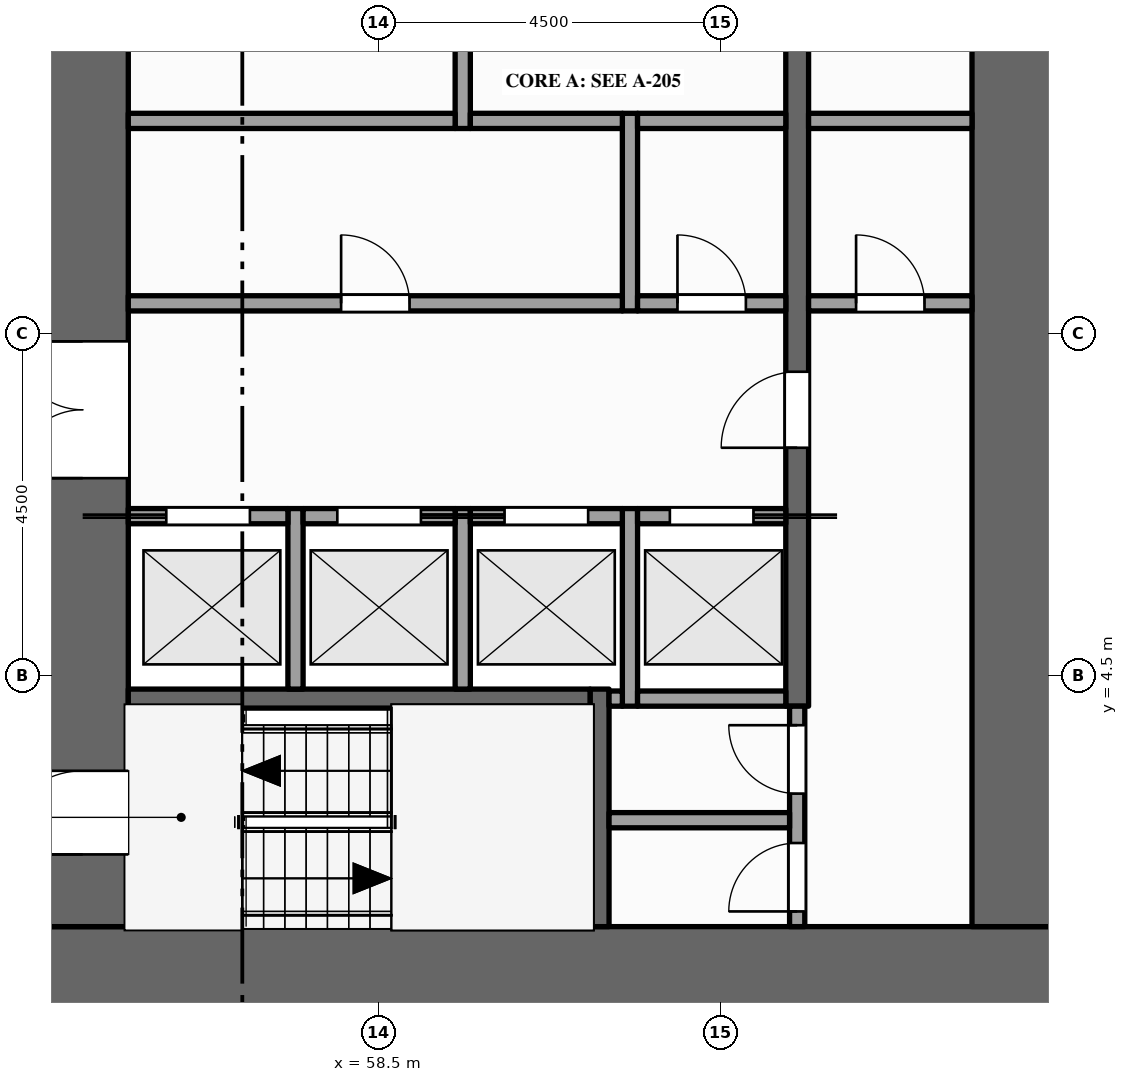
"""IFC4 building model, lengths in metres.
Left out: names, types, materials, properties, quantities, classifications, styles, units other than length and angle.
Written with IfcOpenShell. Run it as: python <this file> out.ifc"""

import sys

from ifc_helpers import new_model, si_unit, direction, frame, frame_2d, origin, place, context, subcontext, project, spatial, rectangle, extrude, element, fill, save


model = new_model("IFC4")
c1 = context("Model", 3, precision=1e-05, world=origin(), true_north=direction((0.0, 1.0)))
c2 = subcontext(c1, "Body", "Model", "MODEL_VIEW")
j1 = project(units=[si_unit("LENGTHUNIT", "METRE"), si_unit("PLANEANGLEUNIT", "RADIAN")], contexts=[c1])
p1 = place(None, origin())
s1 = spatial("IfcSite", under=j1, at=p1, CompositionType="ELEMENT")
p2 = place(p1, origin())
s2 = spatial("IfcBuilding", under=s1, at=p2, CompositionType="ELEMENT")
p3 = place(p2, frame((0.0, 0.0, 24.0)))
s3 = spatial("IfcBuildingStorey", under=s2, at=p3, CompositionType="ELEMENT", Elevation=24.0)
p4 = place(p3, frame((67.5, 0.6, -0.15), z_axis=(0.0, 0.0, 1.0), x_axis=(-1.0, 0.0, 0.0)))
e1 = element("IfcWall", 1, at=p4, inside=s3, PredefinedType="SHEAR", context=c2, shape_type="SweptSolid", body=[
    extrude(rectangle(XDim=13.5, YDim=1.2, at=frame_2d((6.75, 0.0))), origin(), (0.0, 0.0, 1.0), 5.0),
])
p5 = place(p3, frame((54.6, 1.2, -0.15), z_axis=(0.0, 0.0, 1.0), x_axis=(0.0, 1.0, 0.0)))
e2 = element("IfcWall", 2, at=p5, inside=s3, PredefinedType="SHEAR", context=c2, shape_type="SweptSolid", body=[
    extrude(rectangle(XDim=20.1, YDim=1.2, at=frame_2d((10.05, 0.0))), origin(), (0.0, 0.0, 1.0), 5.0),
])
p6 = place(p5, frame((5.9, 0.0, 0.15)))
e3 = element("IfcOpeningElement", 3, at=p6, cuts=e2, PredefinedType="OPENING", context=c2, shape_type="SweptSolid", body=[
    extrude(rectangle(XDim=1.8, YDim=2.1, at=frame_2d((0.9, 1.05))), frame((0.0, 0.61, 0.0), z_axis=(0.0, -1.0, 0.0), x_axis=(1.0, 0.0, 0.0)), (0.0, 0.0, 1.0), 1.22),
])
p7 = place(p5, frame((11.95, 0.0, 0.15)))
e4 = element("IfcOpeningElement", 4, at=p7, cuts=e2, PredefinedType="OPENING", context=c2, shape_type="SweptSolid", body=[
    extrude(rectangle(XDim=1.1, YDim=2.1, at=frame_2d((0.55, 1.05))), frame((0.0, 0.61, 0.0), z_axis=(0.0, -1.0, 0.0), x_axis=(1.0, 0.0, 0.0)), (0.0, 0.0, 1.0), 1.22),
])
p8 = place(p5, frame((0.95, 0.0, 0.15)))
e5 = element("IfcOpeningElement", 5, at=p8, cuts=e2, PredefinedType="OPENING", context=c2, shape_type="SweptSolid", body=[
    extrude(rectangle(XDim=1.1, YDim=2.1, at=frame_2d((0.55, 1.05))), frame((0.0, 0.61, 0.0), z_axis=(0.0, -1.0, 0.0), x_axis=(1.0, 0.0, 0.0)), (0.0, 0.0, 1.0), 1.22),
])
p9 = place(p5, frame((18.15, 0.0, 0.15)))
e6 = element("IfcOpeningElement", 6, at=p9, cuts=e2, PredefinedType="OPENING", context=c2, shape_type="SweptSolid", body=[
    extrude(rectangle(XDim=1.1, YDim=2.1, at=frame_2d((0.55, 1.05))), frame((0.0, 0.61, 0.0), z_axis=(0.0, -1.0, 0.0), x_axis=(1.0, 0.0, 0.0)), (0.0, 0.0, 1.0), 1.22),
])
p10 = place(p3, frame((66.9, 1.2, -0.15), z_axis=(0.0, 0.0, 1.0), x_axis=(0.0, 1.0, 0.0)))
e7 = element("IfcWall", 7, at=p10, inside=s3, PredefinedType="SHEAR", context=c2, shape_type="SweptSolid", body=[
    extrude(rectangle(XDim=20.1, YDim=1.2, at=frame_2d((10.05, 0.0))), origin(), (0.0, 0.0, 1.0), 5.0),
])
for number, where, z_axis, x_axis in (
    (8, (57.4, 4.325, 0.0), (0.0, 0.0, 1.0), (0.0, 1.0, 0.0)),
    (9, (59.6, 4.325, 0.0), (0.0, 0.0, 1.0), (0.0, 1.0, 0.0)),
):
    element("IfcWall", number, at=place(p3, frame(where, z_axis=z_axis, x_axis=x_axis)), inside=s3, PredefinedType="SOLIDWALL", context=c2, shape_type="SweptSolid", body=[
        extrude(rectangle(XDim=2.375, YDim=0.2, at=frame_2d((1.188, 0.0))), origin(), (0.0, 0.0, 1.0), 4.85),
    ])
p11 = place(p3, frame((59.6, 11.7, 0.0), z_axis=(0.0, 0.0, 1.0), x_axis=(0.0, 1.0, 0.0)))
e10 = element("IfcWall", 10, at=p11, inside=s3, PredefinedType="PARTITIONING", context=c2, shape_type="SweptSolid", body=[
    extrude(rectangle(XDim=3.8, YDim=0.2, at=frame_2d((1.9, 0.0))), origin(), (0.0, 0.0, 1.0), 4.85),
])
p12 = place(p11, frame((1.5, 0.0, 0.0)))
e11 = element("IfcOpeningElement", 11, at=p12, cuts=e10, PredefinedType="OPENING", context=c2, shape_type="SweptSolid", body=[
    extrude(rectangle(XDim=1.0, YDim=2.1, at=frame_2d((0.5, 1.05))), frame((0.0, 0.11, 0.0), z_axis=(0.0, -1.0, 0.0), x_axis=(1.0, 0.0, 0.0)), (0.0, 0.0, 1.0), 0.22),
])
p13 = place(p3, frame((61.4, 1.2, 0.0), z_axis=(0.0, 0.0, 1.0), x_axis=(0.0, 1.0, 0.0)))
e12 = element("IfcWall", 12, at=p13, inside=s3, PredefinedType="SHEAR", context=c2, shape_type="SweptSolid", body=[
    extrude(rectangle(XDim=3.125, YDim=0.25, at=frame_2d((1.562, 0.0))), origin(), (0.0, 0.0, 1.0), 4.85),
])
p14 = place(p3, frame((61.8, 4.1, 0.0), z_axis=(0.0, 0.0, 1.0), x_axis=(0.0, 1.0, 0.0)))
e13 = element("IfcWall", 13, at=p14, inside=s3, PredefinedType="SOLIDWALL", context=c2, shape_type="SweptSolid", body=[
    extrude(rectangle(XDim=2.6, YDim=0.2, at=frame_2d((1.3, 0.0))), origin(), (0.0, 0.0, 1.0), 4.85),
])
p15 = place(p3, frame((61.8, 9.3, 0.0), z_axis=(0.0, 0.0, 1.0), x_axis=(0.0, 1.0, 0.0)))
e14 = element("IfcWall", 14, at=p15, inside=s3, PredefinedType="PARTITIONING", context=c2, shape_type="SweptSolid", body=[
    extrude(rectangle(XDim=2.6, YDim=0.2, at=frame_2d((1.3, 0.0))), origin(), (0.0, 0.0, 1.0), 4.85),
])
p16 = place(p3, frame((64.0, 1.2, 0.0), z_axis=(0.0, 0.0, 1.0), x_axis=(0.0, 1.0, 0.0)))
e15 = element("IfcWall", 15, at=p16, inside=s3, PredefinedType="PARTITIONING", context=c2, shape_type="SweptSolid", body=[
    extrude(rectangle(XDim=2.9, YDim=0.2, at=frame_2d((1.45, 0.0))), origin(), (0.0, 0.0, 1.0), 4.85),
])
p17 = place(p16, frame((0.2, 0.0, 0.0)))
e16 = element("IfcOpeningElement", 16, at=p17, cuts=e15, PredefinedType="OPENING", context=c2, shape_type="SweptSolid", body=[
    extrude(rectangle(XDim=0.9, YDim=2.1, at=frame_2d((0.45, 1.05))), frame((0.0, 0.11, 0.0), z_axis=(0.0, -1.0, 0.0), x_axis=(1.0, 0.0, 0.0)), (0.0, 0.0, 1.0), 0.22),
])
p18 = place(p16, frame((1.75, 0.0, 0.0)))
e17 = element("IfcOpeningElement", 17, at=p18, cuts=e15, PredefinedType="OPENING", context=c2, shape_type="SweptSolid", body=[
    extrude(rectangle(XDim=0.9, YDim=2.1, at=frame_2d((0.45, 1.05))), frame((0.0, 0.11, 0.0), z_axis=(0.0, -1.0, 0.0), x_axis=(1.0, 0.0, 0.0)), (0.0, 0.0, 1.0), 0.22),
])
p19 = place(p3, frame((64.0, 4.1, 0.0), z_axis=(0.0, 0.0, 1.0), x_axis=(0.0, 1.0, 0.0)))
e18 = element("IfcWall", 18, at=p19, inside=s3, PredefinedType="SHEAR", context=c2, shape_type="SweptSolid", body=[
    extrude(rectangle(XDim=14.5, YDim=0.3, at=frame_2d((7.25, 0.0))), origin(), (0.0, 0.0, 1.0), 4.85),
])
p20 = place(p19, frame((3.4, 0.0, 0.0)))
e19 = element("IfcOpeningElement", 19, at=p20, cuts=e18, PredefinedType="OPENING", context=c2, shape_type="SweptSolid", body=[
    extrude(rectangle(XDim=1.0, YDim=2.1, at=frame_2d((0.5, 1.05))), frame((0.0, 0.16, 0.0), z_axis=(0.0, -1.0, 0.0), x_axis=(1.0, 0.0, 0.0)), (0.0, 0.0, 1.0), 0.32),
])
p21 = place(p19, frame((9.1, 0.0, 0.0)))
e20 = element("IfcOpeningElement", 20, at=p21, cuts=e18, PredefinedType="OPENING", context=c2, shape_type="SweptSolid", body=[
    extrude(rectangle(XDim=1.0, YDim=2.1, at=frame_2d((0.5, 1.05))), frame((0.0, 0.16, 0.0), z_axis=(0.0, -1.0, 0.0), x_axis=(1.0, 0.0, 0.0)), (0.0, 0.0, 1.0), 0.32),
])
p22 = place(p3, frame((61.525, 2.6, 0.0), z_axis=(0.0, 0.0, 1.0), x_axis=(1.0, 0.0, 0.0)))
e21 = element("IfcWall", 21, at=p22, inside=s3, PredefinedType="PARTITIONING", context=c2, shape_type="SweptSolid", body=[
    extrude(rectangle(XDim=2.375, YDim=0.2, at=frame_2d((1.188, 0.0))), origin(), (0.0, 0.0, 1.0), 4.85),
])
p23 = place(p3, frame((55.2, 4.2, 0.0), z_axis=(0.0, 0.0, 1.0), x_axis=(1.0, 0.0, 0.0)))
e22 = element("IfcWall", 22, at=p23, inside=s3, PredefinedType="SHEAR", context=c2, shape_type="SweptSolid", body=[
    extrude(rectangle(XDim=6.075, YDim=0.25, at=frame_2d((3.038, 0.0))), origin(), (0.0, 0.0, 1.0), 4.85),
])
p24 = place(p3, frame((61.525, 4.2, 0.0), z_axis=(0.0, 0.0, 1.0), x_axis=(1.0, 0.0, 0.0)))
e23 = element("IfcWall", 23, at=p24, inside=s3, PredefinedType="SOLIDWALL", context=c2, shape_type="SweptSolid", body=[
    extrude(rectangle(XDim=0.175, YDim=0.2, at=frame_2d((0.087, 0.0))), origin(), (0.0, 0.0, 1.0), 4.85),
])
p25 = place(p3, frame((61.9, 4.2, 0.0), z_axis=(0.0, 0.0, 1.0), x_axis=(1.0, 0.0, 0.0)))
e24 = element("IfcWall", 24, at=p25, inside=s3, PredefinedType="SOLIDWALL", context=c2, shape_type="SweptSolid", body=[
    extrude(rectangle(XDim=1.95, YDim=0.2, at=frame_2d((0.975, 0.0))), origin(), (0.0, 0.0, 1.0), 4.85),
])
p26 = place(p3, frame((55.2, 6.6, 0.0), z_axis=(0.0, 0.0, 1.0), x_axis=(1.0, 0.0, 0.0)))
e25 = element("IfcWall", 25, at=p26, inside=s3, PredefinedType="SOLIDWALL", context=c2, shape_type="SweptSolid", body=[
    extrude(rectangle(XDim=2.1, YDim=0.2, at=frame_2d((1.05, 0.0))), origin(), (0.0, 0.0, 1.0), 4.85),
])
p27 = place(p26, frame((0.5, 0.0, 0.012)))
e26 = element("IfcOpeningElement", 26, at=p27, cuts=e25, PredefinedType="OPENING", context=c2, shape_type="SweptSolid", body=[
    extrude(rectangle(XDim=1.1, YDim=2.1, at=frame_2d((0.55, 1.05))), frame((0.0, 0.11, 0.0), z_axis=(0.0, -1.0, 0.0), x_axis=(1.0, 0.0, 0.0)), (0.0, 0.0, 1.0), 0.22),
])
p28 = place(p3, frame((57.5, 6.6, 0.0), z_axis=(0.0, 0.0, 1.0), x_axis=(1.0, 0.0, 0.0)))
e27 = element("IfcWall", 27, at=p28, inside=s3, PredefinedType="SOLIDWALL", context=c2, shape_type="SweptSolid", body=[
    extrude(rectangle(XDim=2.0, YDim=0.2, at=frame_2d((1.0, 0.0))), origin(), (0.0, 0.0, 1.0), 4.85),
])
p29 = place(p28, frame((0.45, 0.0, 0.012)))
e28 = element("IfcOpeningElement", 28, at=p29, cuts=e27, PredefinedType="OPENING", context=c2, shape_type="SweptSolid", body=[
    extrude(rectangle(XDim=1.1, YDim=2.1, at=frame_2d((0.55, 1.05))), frame((0.0, 0.11, 0.0), z_axis=(0.0, -1.0, 0.0), x_axis=(1.0, 0.0, 0.0)), (0.0, 0.0, 1.0), 0.22),
])
p30 = place(p3, frame((59.7, 6.6, 0.0), z_axis=(0.0, 0.0, 1.0), x_axis=(1.0, 0.0, 0.0)))
e29 = element("IfcWall", 29, at=p30, inside=s3, PredefinedType="SOLIDWALL", context=c2, shape_type="SweptSolid", body=[
    extrude(rectangle(XDim=2.0, YDim=0.2, at=frame_2d((1.0, 0.0))), origin(), (0.0, 0.0, 1.0), 4.85),
])
p31 = place(p30, frame((0.45, 0.0, 0.012)))
e30 = element("IfcOpeningElement", 30, at=p31, cuts=e29, PredefinedType="OPENING", context=c2, shape_type="SweptSolid", body=[
    extrude(rectangle(XDim=1.1, YDim=2.1, at=frame_2d((0.55, 1.05))), frame((0.0, 0.11, 0.0), z_axis=(0.0, -1.0, 0.0), x_axis=(1.0, 0.0, 0.0)), (0.0, 0.0, 1.0), 0.22),
])
p32 = place(p3, frame((61.9, 6.6, 0.0), z_axis=(0.0, 0.0, 1.0), x_axis=(1.0, 0.0, 0.0)))
e31 = element("IfcWall", 31, at=p32, inside=s3, PredefinedType="SOLIDWALL", context=c2, shape_type="SweptSolid", body=[
    extrude(rectangle(XDim=1.95, YDim=0.2, at=frame_2d((0.975, 0.0))), origin(), (0.0, 0.0, 1.0), 4.85),
])
p33 = place(p32, frame((0.425, 0.0, 0.012)))
e32 = element("IfcOpeningElement", 32, at=p33, cuts=e31, PredefinedType="OPENING", context=c2, shape_type="SweptSolid", body=[
    extrude(rectangle(XDim=1.1, YDim=2.1, at=frame_2d((0.55, 1.05))), frame((0.0, 0.11, 0.0), z_axis=(0.0, -1.0, 0.0), x_axis=(1.0, 0.0, 0.0)), (0.0, 0.0, 1.0), 0.22),
])
p34 = place(p3, frame((55.2, 9.4, 0.0), z_axis=(0.0, 0.0, 1.0), x_axis=(1.0, 0.0, 0.0)))
e33 = element("IfcWall", 33, at=p34, inside=s3, PredefinedType="PARTITIONING", context=c2, shape_type="SweptSolid", body=[
    extrude(rectangle(XDim=6.5, YDim=0.2, at=frame_2d((3.25, 0.0))), origin(), (0.0, 0.0, 1.0), 4.85),
])
p35 = place(p34, frame((2.8, 0.0, 0.0)))
e34 = element("IfcOpeningElement", 34, at=p35, cuts=e33, PredefinedType="OPENING", context=c2, shape_type="SweptSolid", body=[
    extrude(rectangle(XDim=0.9, YDim=2.1, at=frame_2d((0.45, 1.05))), frame((0.0, 0.11, 0.0), z_axis=(0.0, -1.0, 0.0), x_axis=(1.0, 0.0, 0.0)), (0.0, 0.0, 1.0), 0.22),
])
p36 = place(p3, frame((61.9, 9.4, 0.0), z_axis=(0.0, 0.0, 1.0), x_axis=(1.0, 0.0, 0.0)))
e35 = element("IfcWall", 35, at=p36, inside=s3, PredefinedType="PARTITIONING", context=c2, shape_type="SweptSolid", body=[
    extrude(rectangle(XDim=1.95, YDim=0.2, at=frame_2d((0.975, 0.0))), origin(), (0.0, 0.0, 1.0), 4.85),
])
p37 = place(p36, frame((0.525, 0.0, 0.0)))
e36 = element("IfcOpeningElement", 36, at=p37, cuts=e35, PredefinedType="OPENING", context=c2, shape_type="SweptSolid", body=[
    extrude(rectangle(XDim=0.9, YDim=2.1, at=frame_2d((0.45, 1.05))), frame((0.0, 0.11, 0.0), z_axis=(0.0, -1.0, 0.0), x_axis=(1.0, 0.0, 0.0)), (0.0, 0.0, 1.0), 0.22),
])
p38 = place(p3, frame((64.15, 9.4, 0.0), z_axis=(0.0, 0.0, 1.0), x_axis=(1.0, 0.0, 0.0)))
e37 = element("IfcWall", 37, at=p38, inside=s3, PredefinedType="PARTITIONING", context=c2, shape_type="SweptSolid", body=[
    extrude(rectangle(XDim=2.15, YDim=0.2, at=frame_2d((1.075, 0.0))), origin(), (0.0, 0.0, 1.0), 4.85),
])
p39 = place(p38, frame((0.625, 0.0, 0.0)))
e38 = element("IfcOpeningElement", 38, at=p39, cuts=e37, PredefinedType="OPENING", context=c2, shape_type="SweptSolid", body=[
    extrude(rectangle(XDim=0.9, YDim=2.1, at=frame_2d((0.45, 1.05))), frame((0.0, 0.11, 0.0), z_axis=(0.0, -1.0, 0.0), x_axis=(1.0, 0.0, 0.0)), (0.0, 0.0, 1.0), 0.22),
])
p40 = place(p3, frame((55.2, 11.8, 0.0), z_axis=(0.0, 0.0, 1.0), x_axis=(1.0, 0.0, 0.0)))
e39 = element("IfcWall", 39, at=p40, inside=s3, PredefinedType="PARTITIONING", context=c2, shape_type="SweptSolid", body=[
    extrude(rectangle(XDim=4.3, YDim=0.2, at=frame_2d((2.15, 0.0))), origin(), (0.0, 0.0, 1.0), 4.85),
])
p41 = place(p3, frame((59.7, 11.8, 0.0), z_axis=(0.0, 0.0, 1.0), x_axis=(1.0, 0.0, 0.0)))
e40 = element("IfcWall", 40, at=p41, inside=s3, PredefinedType="PARTITIONING", context=c2, shape_type="SweptSolid", body=[
    extrude(rectangle(XDim=2.0, YDim=0.2, at=frame_2d((1.0, 0.0))), origin(), (0.0, 0.0, 1.0), 4.85),
])
p42 = place(p3, frame((61.9, 11.8, 0.0), z_axis=(0.0, 0.0, 1.0), x_axis=(1.0, 0.0, 0.0)))
e41 = element("IfcWall", 41, at=p42, inside=s3, PredefinedType="PARTITIONING", context=c2, shape_type="SweptSolid", body=[
    extrude(rectangle(XDim=1.95, YDim=0.2, at=frame_2d((0.975, 0.0))), origin(), (0.0, 0.0, 1.0), 4.85),
])
p43 = place(p3, frame((64.15, 11.8, 0.0), z_axis=(0.0, 0.0, 1.0), x_axis=(1.0, 0.0, 0.0)))
e42 = element("IfcWall", 42, at=p43, inside=s3, PredefinedType="PARTITIONING", context=c2, shape_type="SweptSolid", body=[
    extrude(rectangle(XDim=2.15, YDim=0.2, at=frame_2d((1.075, 0.0))), origin(), (0.0, 0.0, 1.0), 4.85),
])
p44 = place(p27, origin())
e43 = element("IfcDoor", 43, at=p44, inside=s3, OperationType="SLIDING_TO_LEFT", PredefinedType="DOOR", context=c2, shape_type="SweptSolid", body=[
    extrude(rectangle(XDim=1.1, YDim=2.1, at=frame_2d((0.55, 1.05))), frame((0.0, 0.025, 0.0), z_axis=(0.0, -1.0, 0.0), x_axis=(1.0, 0.0, 0.0)), (0.0, 0.0, 1.0), 0.05),
])
fill(e26, e43)
p45 = place(p29, origin())
e44 = element("IfcDoor", 44, at=p45, inside=s3, OperationType="SLIDING_TO_RIGHT", PredefinedType="DOOR", context=c2, shape_type="SweptSolid", body=[
    extrude(rectangle(XDim=1.1, YDim=2.1, at=frame_2d((0.55, 1.05))), frame((0.0, 0.025, 0.0), z_axis=(0.0, -1.0, 0.0), x_axis=(1.0, 0.0, 0.0)), (0.0, 0.0, 1.0), 0.05),
])
fill(e28, e44)
p46 = place(p31, origin())
e45 = element("IfcDoor", 45, at=p46, inside=s3, OperationType="SLIDING_TO_LEFT", PredefinedType="DOOR", context=c2, shape_type="SweptSolid", body=[
    extrude(rectangle(XDim=1.1, YDim=2.1, at=frame_2d((0.55, 1.05))), frame((0.0, 0.025, 0.0), z_axis=(0.0, -1.0, 0.0), x_axis=(1.0, 0.0, 0.0)), (0.0, 0.0, 1.0), 0.05),
])
fill(e30, e45)
p47 = place(p33, origin())
e46 = element("IfcDoor", 46, at=p47, inside=s3, OperationType="SLIDING_TO_RIGHT", PredefinedType="DOOR", context=c2, shape_type="SweptSolid", body=[
    extrude(rectangle(XDim=1.1, YDim=2.1, at=frame_2d((0.55, 1.05))), frame((0.0, 0.025, 0.0), z_axis=(0.0, -1.0, 0.0), x_axis=(1.0, 0.0, 0.0)), (0.0, 0.0, 1.0), 0.05),
])
fill(e32, e46)
p48 = place(p6, origin())
e47 = element("IfcDoor", 47, at=p48, inside=s3, OperationType="DOUBLE_DOOR_SINGLE_SWING", PredefinedType="DOOR", context=c2, shape_type="SweptSolid", body=[
    extrude(rectangle(XDim=1.8, YDim=2.1, at=frame_2d((0.9, 1.05))), frame((0.0, 0.025, 0.0), z_axis=(0.0, -1.0, 0.0), x_axis=(1.0, 0.0, 0.0)), (0.0, 0.0, 1.0), 0.05),
])
fill(e3, e47)
p49 = place(p20, origin())
e48 = element("IfcDoor", 48, at=p49, inside=s3, OperationType="SINGLE_SWING_LEFT", PredefinedType="DOOR", context=c2, shape_type="SweptSolid", body=[
    extrude(rectangle(XDim=1.0, YDim=2.1, at=frame_2d((0.5, 1.05))), frame((0.0, 0.025, 0.0), z_axis=(0.0, -1.0, 0.0), x_axis=(1.0, 0.0, 0.0)), (0.0, 0.0, 1.0), 0.05),
])
fill(e19, e48)
p50 = place(p39, origin())
e49 = element("IfcDoor", 49, at=p50, inside=s3, OperationType="SINGLE_SWING_LEFT", PredefinedType="DOOR", context=c2, shape_type="SweptSolid", body=[
    extrude(rectangle(XDim=0.9, YDim=2.1, at=frame_2d((0.45, 1.05))), frame((0.0, 0.025, 0.0), z_axis=(0.0, -1.0, 0.0), x_axis=(1.0, 0.0, 0.0)), (0.0, 0.0, 1.0), 0.05),
])
fill(e38, e49)
p51 = place(p8, origin())
e50 = element("IfcDoor", 50, at=p51, inside=s3, OperationType="SINGLE_SWING_LEFT", PredefinedType="DOOR", context=c2, shape_type="SweptSolid", body=[
    extrude(rectangle(XDim=1.1, YDim=2.1, at=frame_2d((0.55, 1.05))), frame((0.0, 0.025, 0.0), z_axis=(0.0, -1.0, 0.0), x_axis=(1.0, 0.0, 0.0)), (0.0, 0.0, 1.0), 0.05),
])
fill(e5, e50)
p52 = place(p17, origin())
e51 = element("IfcDoor", 51, at=p52, inside=s3, OperationType="SINGLE_SWING_LEFT", PredefinedType="DOOR", context=c2, shape_type="SweptSolid", body=[
    extrude(rectangle(XDim=0.9, YDim=2.1, at=frame_2d((0.45, 1.05))), frame((0.0, 0.025, 0.0), z_axis=(0.0, -1.0, 0.0), x_axis=(1.0, 0.0, 0.0)), (0.0, 0.0, 1.0), 0.05),
])
fill(e16, e51)
p53 = place(p18, origin())
e52 = element("IfcDoor", 52, at=p53, inside=s3, OperationType="SINGLE_SWING_RIGHT", PredefinedType="DOOR", context=c2, shape_type="SweptSolid", body=[
    extrude(rectangle(XDim=0.9, YDim=2.1, at=frame_2d((0.45, 1.05))), frame((0.0, 0.025, 0.0), z_axis=(0.0, -1.0, 0.0), x_axis=(1.0, 0.0, 0.0)), (0.0, 0.0, 1.0), 0.05),
])
fill(e17, e52)
p54 = place(p35, origin())
e53 = element("IfcDoor", 53, at=p54, inside=s3, OperationType="SINGLE_SWING_LEFT", PredefinedType="DOOR", context=c2, shape_type="SweptSolid", body=[
    extrude(rectangle(XDim=0.9, YDim=2.1, at=frame_2d((0.45, 1.05))), frame((0.0, 0.025, 0.0), z_axis=(0.0, -1.0, 0.0), x_axis=(1.0, 0.0, 0.0)), (0.0, 0.0, 1.0), 0.05),
])
fill(e34, e53)
p55 = place(p37, origin())
e54 = element("IfcDoor", 54, at=p55, inside=s3, OperationType="SINGLE_SWING_LEFT", PredefinedType="DOOR", context=c2, shape_type="SweptSolid", body=[
    extrude(rectangle(XDim=0.9, YDim=2.1, at=frame_2d((0.45, 1.05))), frame((0.0, 0.025, 0.0), z_axis=(0.0, -1.0, 0.0), x_axis=(1.0, 0.0, 0.0)), (0.0, 0.0, 1.0), 0.05),
])
fill(e36, e54)
save(model, sys.argv[1])
